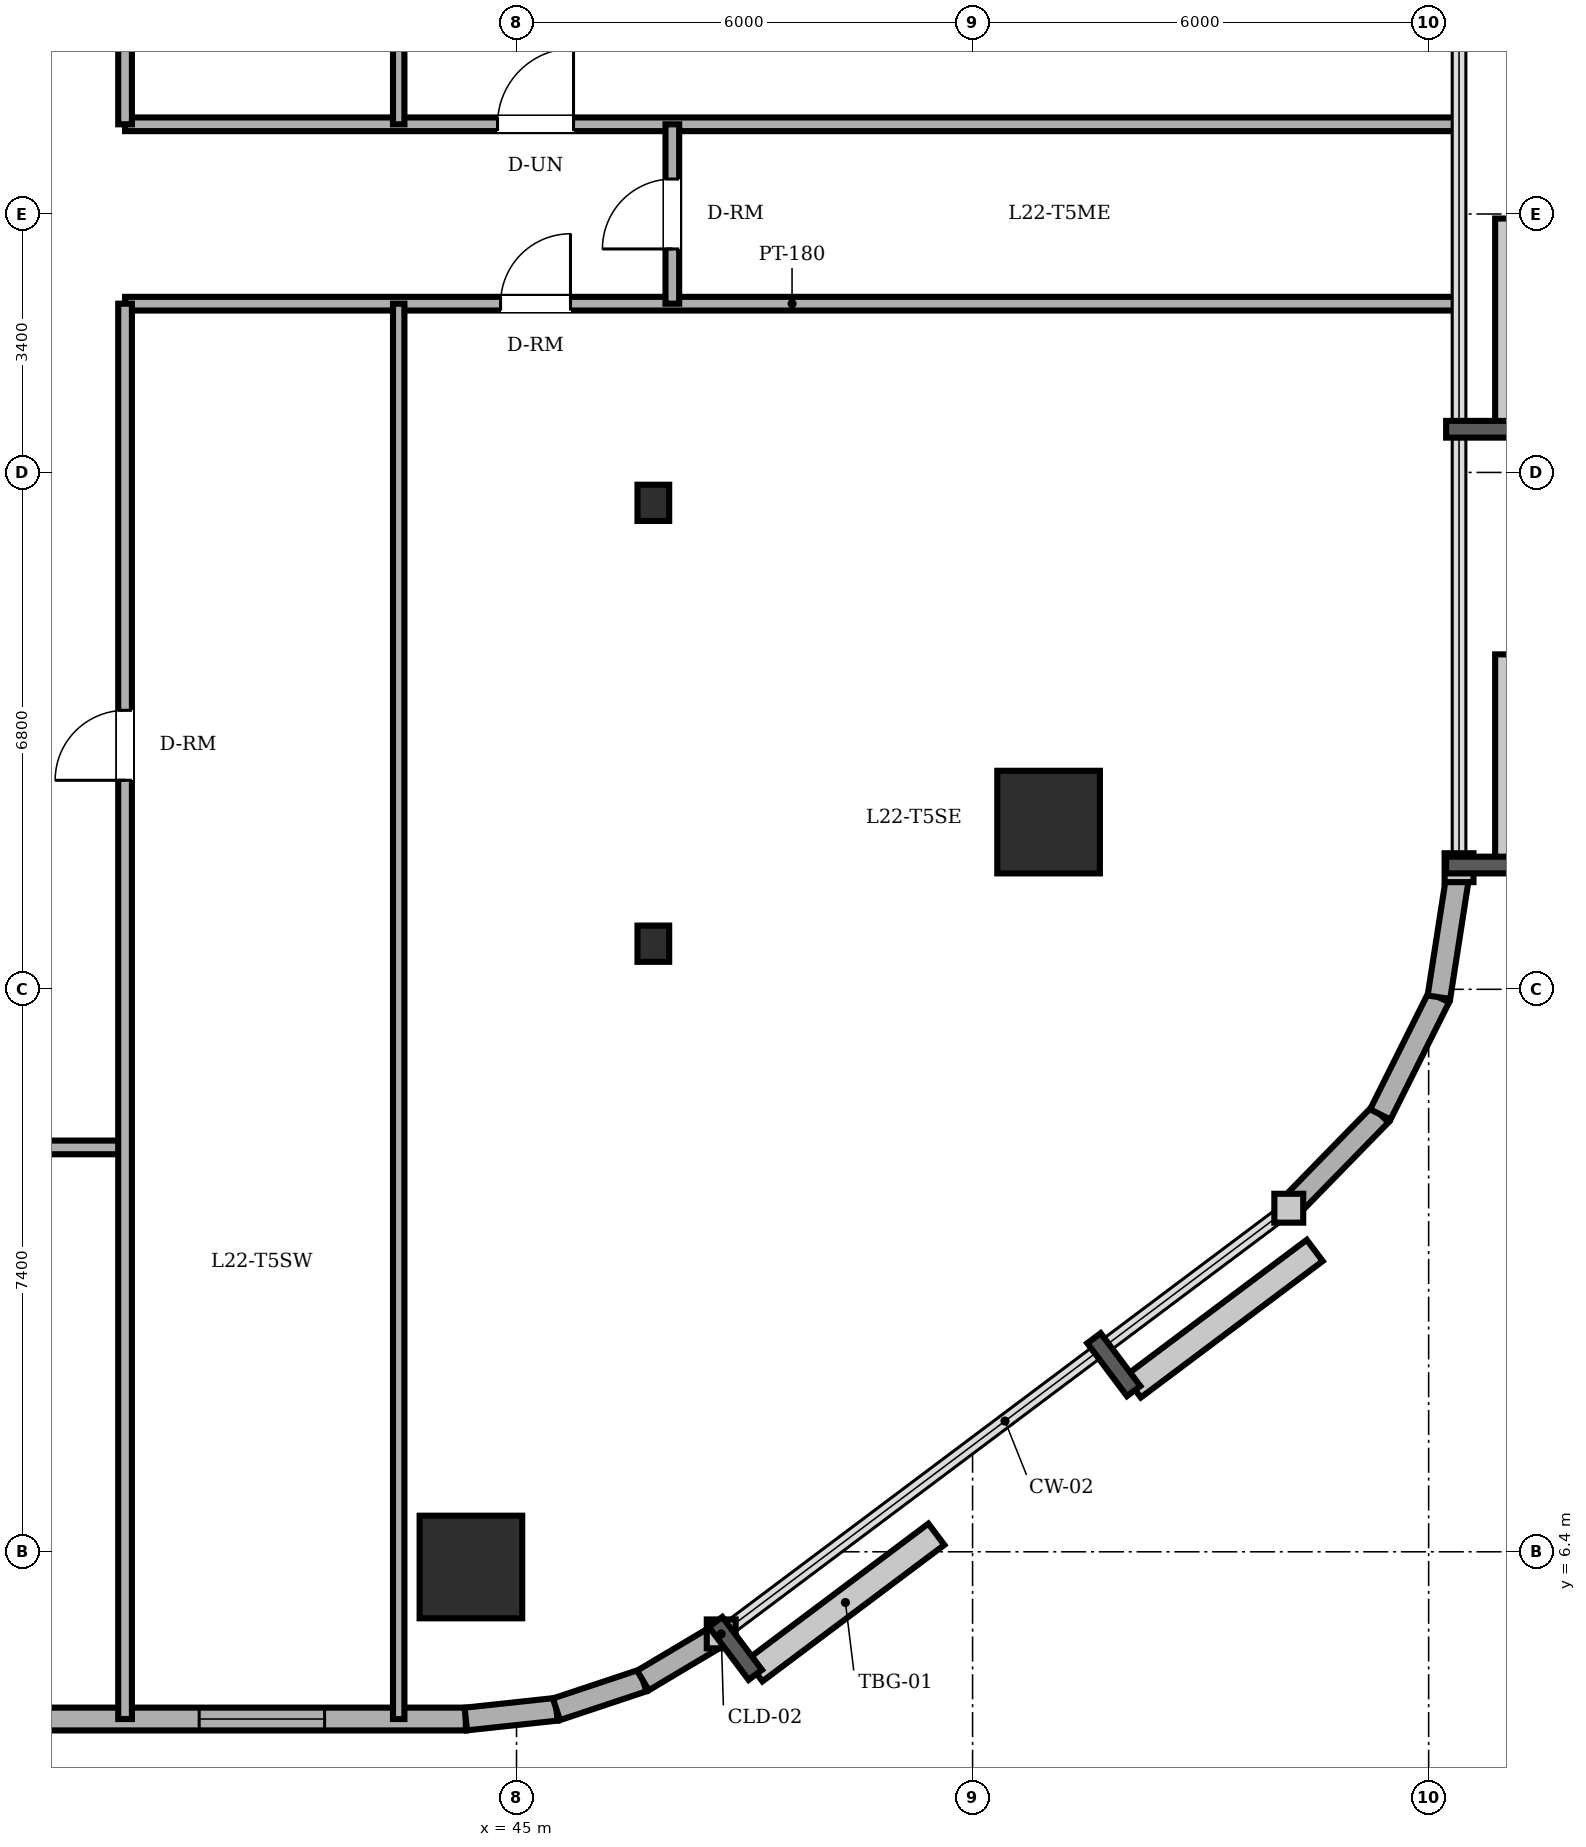
"""IFC4 building model, lengths in metres.
Left out: names, types, materials, properties, quantities, classifications, styles, units other than length and angle.
Written with IfcOpenShell. Run it as: python <this file> out.ifc"""

import sys

from ifc_helpers import new_model, si_unit, direction, frame, frame_2d, origin, origin_2d, place, context, subcontext, project, spatial, rectangle, circle, i_section, extrude, element, fill, save


model = new_model("IFC4")
c1 = context("Model", 3, precision=1e-05, world=origin(), true_north=direction((0.0, 1.0)))
c2 = subcontext(c1, "Body", "Model", "MODEL_VIEW")
j1 = project(units=[si_unit("LENGTHUNIT", "METRE"), si_unit("PLANEANGLEUNIT", "RADIAN")], contexts=[c1])
p1 = place(None, origin())
s1 = spatial("IfcSite", under=j1, at=p1, CompositionType="ELEMENT")
p2 = place(p1, origin())
s2 = spatial("IfcBuilding", under=s1, at=p2, CompositionType="ELEMENT")
p3 = place(p2, frame((0.0, 0.0, 86.3)))
s3 = spatial("IfcBuildingStorey", under=s2, at=p3, CompositionType="ELEMENT", Elevation=86.3)
for number, where, z_axis, x_axis in (
    (1, (44.4, 6.2, 0.0), (0.0, 0.0, 1.0), (1.0, 0.0, 0.0)),
    (2, (52.0, 16.0, 0.0), (0.0, 0.0, 1.0), (1.0, 0.0, 0.0)),
):
    element("IfcColumn", number, at=place(p3, frame(where, z_axis=z_axis, x_axis=x_axis)), inside=s3, PredefinedType="COLUMN", context=c2, shape_type="SweptSolid", body=[
        extrude(circle(Radius=0.675, at=origin_2d()), origin(), (0.0, 0.0, 1.0), 3.6),
    ])
for number, where, z_axis, x_axis in (
    (3, (46.8, 14.4, 0.0), (0.0, 0.0, 1.0), (1.0, 0.0, 0.0)),
    (4, (46.8, 20.2, 0.0), (0.0, 0.0, 1.0), (1.0, 0.0, 0.0)),
):
    element("IfcColumn", number, at=place(p3, frame(where, z_axis=z_axis, x_axis=x_axis)), inside=s3, PredefinedType="COLUMN", context=c2, shape_type="SweptSolid", body=[
        extrude(i_section(OverallWidth=0.417, OverallDepth=0.477, WebThickness=0.036, FlangeThickness=0.057, FilletRadius=0.015, at=origin_2d()), origin(), (0.0, 0.0, 1.0), 3.6),
    ])
p4 = place(p3, frame((14.4, 4.2, 0.0), z_axis=(0.0, 0.0, 1.0), x_axis=(1.0, 0.0, 0.0)))
e5 = element("IfcWall", 5, at=p4, inside=s3, PredefinedType="SOLIDWALL", context=c2, shape_type="SweptSolid", body=[
    extrude(rectangle(XDim=29.933, YDim=0.3, at=frame_2d((14.967, 0.0))), origin(), (0.0, 0.0, 1.0), 3.4),
])
p5 = place(p4, frame((7.025, 0.0, 0.0)))
e6 = element("IfcOpeningElement", 6, at=p5, cuts=e5, PredefinedType="OPENING", context=c2, shape_type="SweptSolid", body=[
    extrude(rectangle(XDim=0.95, YDim=2.2, at=frame_2d((0.475, 1.1))), frame((0.0, 0.16, 0.0), z_axis=(0.0, -1.0, 0.0), x_axis=(1.0, 0.0, 0.0)), (0.0, 0.0, 1.0), 0.32),
])
p6 = place(p4, frame((2.342, 0.0, 0.85)))
e7 = element("IfcOpeningElement", 7, at=p6, cuts=e5, PredefinedType="OPENING", context=c2, shape_type="SweptSolid", body=[
    extrude(rectangle(XDim=1.65, YDim=1.55, at=frame_2d((0.825, 0.775))), frame((0.0, 0.16, 0.0), z_axis=(0.0, -1.0, 0.0), x_axis=(1.0, 0.0, 0.0)), (0.0, 0.0, 1.0), 0.32),
])
p7 = place(p4, frame((9.875, 0.0, 0.85)))
e8 = element("IfcOpeningElement", 8, at=p7, cuts=e5, PredefinedType="OPENING", context=c2, shape_type="SweptSolid", body=[
    extrude(rectangle(XDim=1.65, YDim=1.55, at=frame_2d((0.825, 0.775))), frame((0.0, 0.16, 0.0), z_axis=(0.0, -1.0, 0.0), x_axis=(1.0, 0.0, 0.0)), (0.0, 0.0, 1.0), 0.32),
])
p8 = place(p4, frame((16.058, 0.0, 0.85)))
e9 = element("IfcOpeningElement", 9, at=p8, cuts=e5, PredefinedType="OPENING", context=c2, shape_type="SweptSolid", body=[
    extrude(rectangle(XDim=1.65, YDim=1.55, at=frame_2d((0.825, 0.775))), frame((0.0, 0.16, 0.0), z_axis=(0.0, -1.0, 0.0), x_axis=(1.0, 0.0, 0.0)), (0.0, 0.0, 1.0), 0.32),
])
p9 = place(p4, frame((20.342, 0.0, 0.85)))
e10 = element("IfcOpeningElement", 10, at=p9, cuts=e5, PredefinedType="OPENING", context=c2, shape_type="SweptSolid", body=[
    extrude(rectangle(XDim=1.65, YDim=1.55, at=frame_2d((0.825, 0.775))), frame((0.0, 0.16, 0.0), z_axis=(0.0, -1.0, 0.0), x_axis=(1.0, 0.0, 0.0)), (0.0, 0.0, 1.0), 0.32),
])
p10 = place(p4, frame((26.425, 0.0, 0.85)))
e11 = element("IfcOpeningElement", 11, at=p10, cuts=e5, PredefinedType="OPENING", context=c2, shape_type="SweptSolid", body=[
    extrude(rectangle(XDim=1.65, YDim=1.55, at=frame_2d((0.825, 0.775))), frame((0.0, 0.16, 0.0), z_axis=(0.0, -1.0, 0.0), x_axis=(1.0, 0.0, 0.0)), (0.0, 0.0, 1.0), 0.32),
])
p11 = place(p3, frame((44.333, 4.2, 0.0), z_axis=(0.0, 0.0, 1.0), x_axis=(0.994289103787, 0.106720092254, 0.0)))
e12 = element("IfcWall", 12, at=p11, inside=s3, PredefinedType="SOLIDWALL", context=c2, shape_type="SweptSolid", body=[
    extrude(rectangle(XDim=1.199, YDim=0.3, at=frame_2d((0.599, 0.0))), origin(), (0.0, 0.0, 1.0), 3.4),
])
p12 = place(p3, frame((45.525, 4.328, 0.0), z_axis=(0.0, 0.0, 1.0), x_axis=(0.948744332129, 0.316044604847, 0.0)))
e13 = element("IfcWall", 13, at=p12, inside=s3, PredefinedType="SOLIDWALL", context=c2, shape_type="SweptSolid", body=[
    extrude(rectangle(XDim=1.2, YDim=0.3, at=frame_2d((0.6, 0.0))), origin(), (0.0, 0.0, 1.0), 3.4),
])
p13 = place(p3, frame((46.663, 4.707, 0.0), z_axis=(0.0, 0.0, 1.0), x_axis=(0.859320591642, 0.511437308749, 0.0)))
e14 = element("IfcWall", 14, at=p13, inside=s3, PredefinedType="SOLIDWALL", context=c2, shape_type="SweptSolid", body=[
    extrude(rectangle(XDim=1.199, YDim=0.3, at=frame_2d((0.599, 0.0))), origin(), (0.0, 0.0, 1.0), 3.4),
])
for number, where, z_axis, x_axis in (
    (15, (55.16, 10.92, 0.0), (0.0, 0.0, 1.0), (0.698, 0.716, 0.0)),
    (16, (56.364, 12.154, 0.0), (0.0, 0.0, 1.0), (0.447, 0.894, 0.0)),
):
    element("IfcWall", number, at=place(p3, frame(where, z_axis=z_axis, x_axis=x_axis)), inside=s3, PredefinedType="SOLIDWALL", context=c2, shape_type="SweptSolid", body=[
        extrude(rectangle(XDim=1.724, YDim=0.3, at=frame_2d((0.862, 0.0))), origin(), (0.0, 0.0, 1.0), 3.4),
    ])
p14 = place(p3, frame((57.135, 13.696, 0.0), z_axis=(0.0, 0.0, 1.0), x_axis=(0.153620989032, 0.988129845581, 0.0)))
e17 = element("IfcWall", 17, at=p14, inside=s3, PredefinedType="SOLIDWALL", context=c2, shape_type="SweptSolid", body=[
    extrude(rectangle(XDim=1.724, YDim=0.3, at=frame_2d((0.862, 0.0))), origin(), (0.0, 0.0, 1.0), 3.4),
])
p15 = place(p3, frame((8.8, 11.72, 0.0), z_axis=(0.0, 0.0, 1.0), x_axis=(1.0, 0.0, 0.0)))
e18 = element("IfcWall", 18, at=p15, inside=s3, PredefinedType="PARTITIONING", context=c2, shape_type="SweptSolid", body=[
    extrude(rectangle(XDim=31.05, YDim=0.18, at=frame_2d((15.525, 0.0))), origin(), (0.0, 0.0, 1.0), 3.4),
])
p16 = place(p15, frame((15.84, 0.0, 0.0)))
e19 = element("IfcOpeningElement", 19, at=p16, cuts=e18, PredefinedType="OPENING", context=c2, shape_type="SweptSolid", body=[
    extrude(rectangle(XDim=0.92, YDim=2.1, at=frame_2d((0.46, 1.05))), frame((0.0, 0.1, 0.0), z_axis=(0.0, -1.0, 0.0), x_axis=(1.0, 0.0, 0.0)), (0.0, 0.0, 1.0), 0.2),
])
p17 = place(p15, frame((7.34, 0.0, 0.0)))
e20 = element("IfcOpeningElement", 20, at=p17, cuts=e18, PredefinedType="OPENING", context=c2, shape_type="SweptSolid", body=[
    extrude(rectangle(XDim=0.92, YDim=2.1, at=frame_2d((0.46, 1.05))), frame((0.0, 0.1, 0.0), z_axis=(0.0, -1.0, 0.0), x_axis=(1.0, 0.0, 0.0)), (0.0, 0.0, 1.0), 0.2),
])
p18 = place(p15, frame((23.905, 0.0, 0.0)))
e21 = element("IfcOpeningElement", 21, at=p18, cuts=e18, PredefinedType="OPENING", context=c2, shape_type="SweptSolid", body=[
    extrude(rectangle(XDim=0.92, YDim=2.1, at=frame_2d((0.46, 1.05))), frame((0.0, 0.1, 0.0), z_axis=(0.0, -1.0, 0.0), x_axis=(1.0, 0.0, 0.0)), (0.0, 0.0, 1.0), 0.2),
])
p19 = place(p3, frame((39.85, 22.82, 0.0), z_axis=(0.0, 0.0, 1.0), x_axis=(1.0, 0.0, 0.0)))
e22 = element("IfcWall", 22, at=p19, inside=s3, PredefinedType="PARTITIONING", context=c2, shape_type="SweptSolid", body=[
    extrude(rectangle(XDim=17.55, YDim=0.18, at=frame_2d((8.775, 0.0))), origin(), (0.0, 0.0, 1.0), 3.4),
])
p20 = place(p19, frame((4.94, 0.0, 0.0)))
e23 = element("IfcOpeningElement", 23, at=p20, cuts=e22, PredefinedType="OPENING", context=c2, shape_type="SweptSolid", body=[
    extrude(rectangle(XDim=0.92, YDim=2.1, at=frame_2d((0.46, 1.05))), frame((0.0, 0.1, 0.0), z_axis=(0.0, -1.0, 0.0), x_axis=(1.0, 0.0, 0.0)), (0.0, 0.0, 1.0), 0.2),
])
p21 = place(p3, frame((39.85, 25.18, 0.0), z_axis=(0.0, 0.0, 1.0), x_axis=(1.0, 0.0, 0.0)))
e24 = element("IfcWall", 24, at=p21, inside=s3, PredefinedType="PARTITIONING", context=c2, shape_type="SweptSolid", body=[
    extrude(rectangle(XDim=17.55, YDim=0.18, at=frame_2d((8.775, 0.0))), origin(), (0.0, 0.0, 1.0), 3.4),
])
p22 = place(p21, frame((4.9, 0.0, 0.0)))
e25 = element("IfcOpeningElement", 25, at=p22, cuts=e24, PredefinedType="OPENING", context=c2, shape_type="SweptSolid", body=[
    extrude(rectangle(XDim=1.0, YDim=2.15, at=frame_2d((0.5, 1.075))), frame((0.0, 0.1, 0.0), z_axis=(0.0, -1.0, 0.0), x_axis=(1.0, 0.0, 0.0)), (0.0, 0.0, 1.0), 0.2),
])
p23 = place(p3, frame((39.85, 4.2, 0.0), z_axis=(0.0, 0.0, 1.0), x_axis=(0.0, 1.0, 0.0)))
e26 = element("IfcWall", 26, at=p23, inside=s3, PredefinedType="PARTITIONING", context=c2, shape_type="SweptSolid", body=[
    extrude(rectangle(XDim=18.62, YDim=0.18, at=frame_2d((9.31, 0.0))), origin(), (0.0, 0.0, 1.0), 3.4),
])
p24 = place(p23, frame((12.35, 0.0, 0.0)))
e27 = element("IfcOpeningElement", 27, at=p24, cuts=e26, PredefinedType="OPENING", context=c2, shape_type="SweptSolid", body=[
    extrude(rectangle(XDim=0.92, YDim=2.1, at=frame_2d((0.46, 1.05))), frame((0.0, 0.1, 0.0), z_axis=(0.0, -1.0, 0.0), x_axis=(1.0, 0.0, 0.0)), (0.0, 0.0, 1.0), 0.2),
])
p25 = place(p3, frame((39.85, 25.18, 0.0), z_axis=(0.0, 0.0, 1.0), x_axis=(0.0, 1.0, 0.0)))
e28 = element("IfcWall", 28, at=p25, inside=s3, PredefinedType="PARTITIONING", context=c2, shape_type="SweptSolid", body=[
    extrude(rectangle(XDim=18.62, YDim=0.18, at=frame_2d((9.31, 0.0))), origin(), (0.0, 0.0, 1.0), 3.4),
])
p26 = place(p25, frame((5.35, 0.0, 0.0)))
e29 = element("IfcOpeningElement", 29, at=p26, cuts=e28, PredefinedType="OPENING", context=c2, shape_type="SweptSolid", body=[
    extrude(rectangle(XDim=0.92, YDim=2.1, at=frame_2d((0.46, 1.05))), frame((0.0, 0.1, 0.0), z_axis=(0.0, -1.0, 0.0), x_axis=(1.0, 0.0, 0.0)), (0.0, 0.0, 1.0), 0.2),
])
for number, where, z_axis, x_axis in (
    (30, (43.45, 4.2, 0.0), (0.0, 0.0, 1.0), (0.0, 1.0, 0.0)),
    (31, (43.45, 25.18, 0.0), (0.0, 0.0, 1.0), (0.0, 1.0, 0.0)),
):
    element("IfcWall", number, at=place(p3, frame(where, z_axis=z_axis, x_axis=x_axis)), inside=s3, PredefinedType="PARTITIONING", context=c2, shape_type="SweptSolid", body=[
        extrude(rectangle(XDim=18.62, YDim=0.15, at=frame_2d((9.31, 0.0))), origin(), (0.0, 0.0, 1.0), 3.4),
    ])
p27 = place(p3, frame((47.05, 22.82, 0.0), z_axis=(0.0, 0.0, 1.0), x_axis=(0.0, 1.0, 0.0)))
e32 = element("IfcWall", 32, at=p27, inside=s3, PredefinedType="PARTITIONING", context=c2, shape_type="SweptSolid", body=[
    extrude(rectangle(XDim=2.36, YDim=0.18, at=frame_2d((1.18, 0.0))), origin(), (0.0, 0.0, 1.0), 2.882),
])
p28 = place(p27, frame((0.72, 0.0, 0.0)))
e33 = element("IfcOpeningElement", 33, at=p28, cuts=e32, PredefinedType="OPENING", context=c2, shape_type="SweptSolid", body=[
    extrude(rectangle(XDim=0.92, YDim=2.1, at=frame_2d((0.46, 1.05))), frame((0.0, 0.1, 0.0), z_axis=(0.0, -1.0, 0.0), x_axis=(1.0, 0.0, 0.0)), (0.0, 0.0, 1.0), 0.2),
])
p29 = place(p10, origin())
e34 = element("IfcWindow", 34, at=p29, inside=s3, PartitioningType="DOUBLE_PANEL_VERTICAL", PredefinedType="WINDOW", context=c2, shape_type="SweptSolid", body=[
    extrude(rectangle(XDim=1.65, YDim=1.55, at=frame_2d((0.825, 0.775))), frame((0.0, 0.03, 0.0), z_axis=(0.0, -1.0, 0.0), x_axis=(1.0, 0.0, 0.0)), (0.0, 0.0, 1.0), 0.06),
])
fill(e11, e34)
p30 = place(p24, origin())
e35 = element("IfcDoor", 35, at=p30, inside=s3, OperationType="SINGLE_SWING_LEFT", PredefinedType="DOOR", context=c2, shape_type="SweptSolid", body=[
    extrude(rectangle(XDim=0.92, YDim=2.1, at=frame_2d((0.46, 1.05))), frame((0.0, 0.025, 0.0), z_axis=(0.0, -1.0, 0.0), x_axis=(1.0, 0.0, 0.0)), (0.0, 0.0, 1.0), 0.05),
])
fill(e27, e35)
p31 = place(p22, origin())
e36 = element("IfcDoor", 36, at=p31, inside=s3, OperationType="SINGLE_SWING_RIGHT", PredefinedType="DOOR", context=c2, shape_type="SweptSolid", body=[
    extrude(rectangle(XDim=1.0, YDim=2.15, at=frame_2d((0.5, 1.075))), frame((0.0, 0.025, 0.0), z_axis=(0.0, -1.0, 0.0), x_axis=(1.0, 0.0, 0.0)), (0.0, 0.0, 1.0), 0.05),
])
fill(e25, e36)
p32 = place(p28, origin())
e37 = element("IfcDoor", 37, at=p32, inside=s3, OperationType="SINGLE_SWING_LEFT", PredefinedType="DOOR", context=c2, shape_type="SweptSolid", body=[
    extrude(rectangle(XDim=0.92, YDim=2.1, at=frame_2d((0.46, 1.05))), frame((0.0, 0.025, 0.0), z_axis=(0.0, -1.0, 0.0), x_axis=(1.0, 0.0, 0.0)), (0.0, 0.0, 1.0), 0.05),
])
fill(e33, e37)
p33 = place(p20, origin())
e38 = element("IfcDoor", 38, at=p33, inside=s3, OperationType="SINGLE_SWING_RIGHT", PredefinedType="DOOR", context=c2, shape_type="SweptSolid", body=[
    extrude(rectangle(XDim=0.92, YDim=2.1, at=frame_2d((0.46, 1.05))), frame((0.0, 0.025, 0.0), z_axis=(0.0, -1.0, 0.0), x_axis=(1.0, 0.0, 0.0)), (0.0, 0.0, 1.0), 0.05),
])
fill(e23, e38)
save(model, sys.argv[1])
